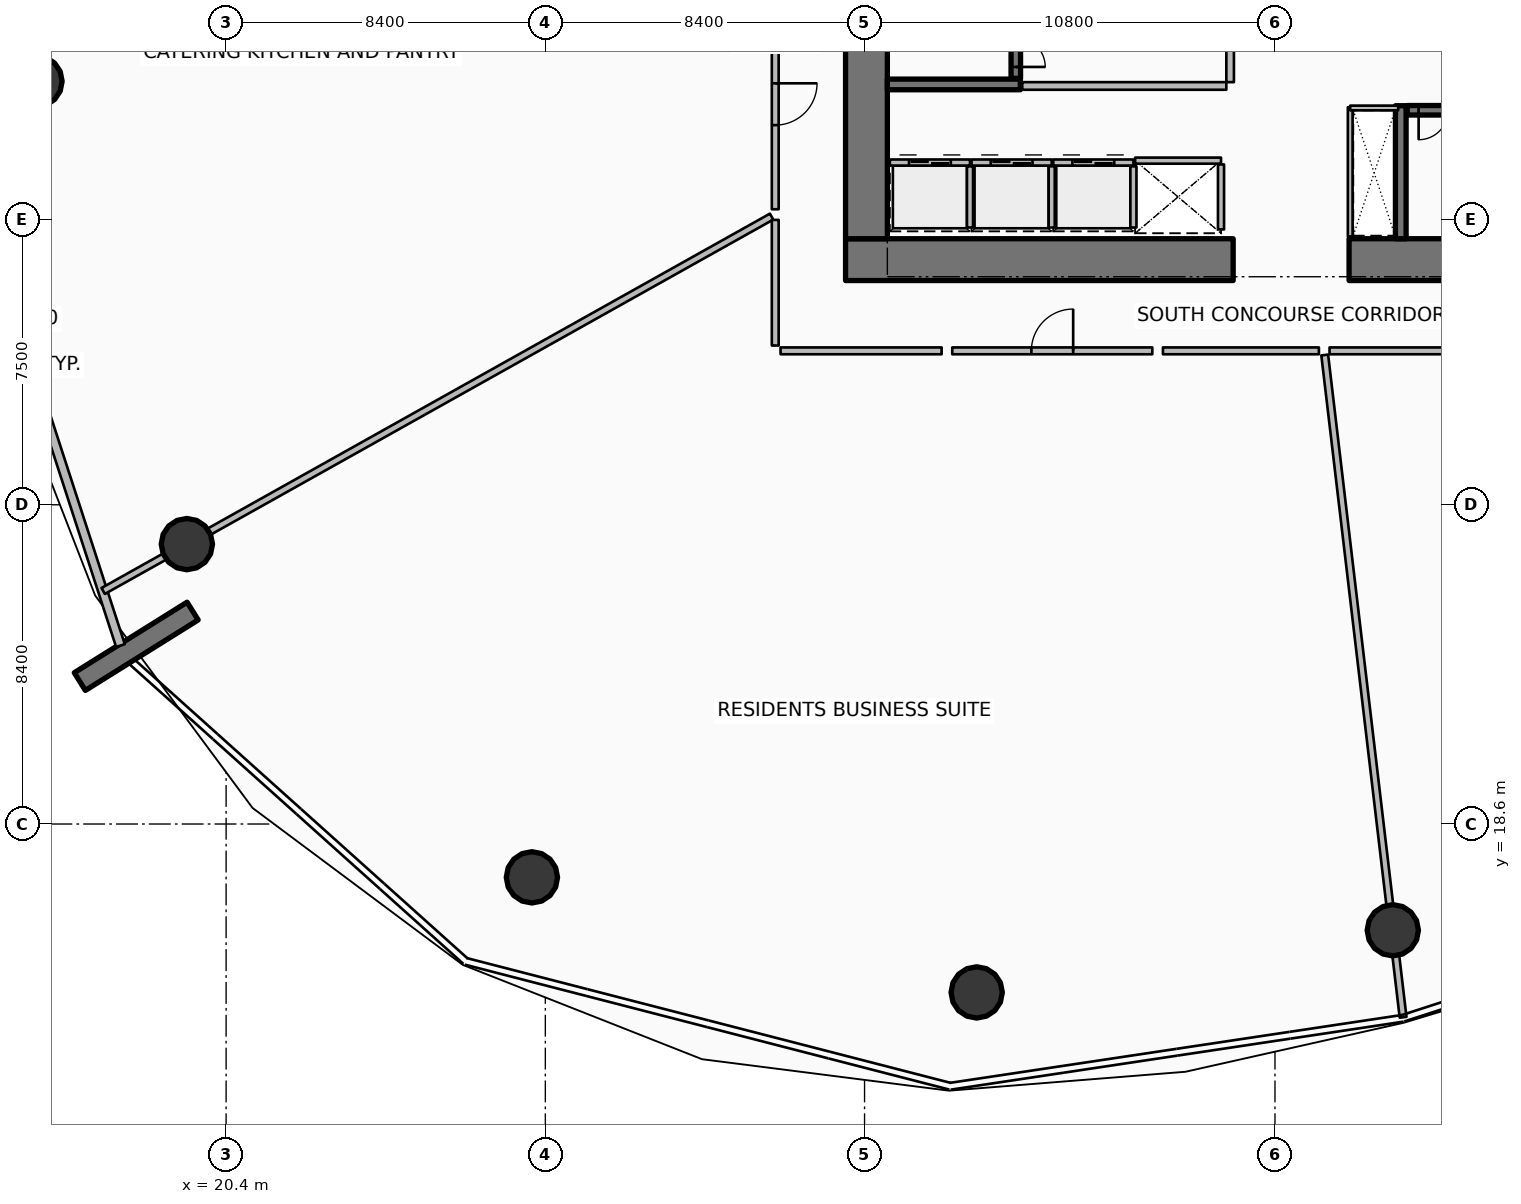
"""IFC4 building model, lengths in metres.
Left out: names, types, materials, properties, quantities, classifications, styles, units other than length and angle.
Written with IfcOpenShell. Run it as: python <this file> out.ifc"""

import sys

from ifc_helpers import new_model, si_unit, direction, frame, frame_2d, origin, origin_2d, place, context, subcontext, project, spatial, rectangle, circle, extrude, element, fill, save


model = new_model("IFC4")
c1 = context("Model", 3, precision=1e-05, world=origin(), true_north=direction((0.0, 1.0)))
c2 = subcontext(c1, "Body", "Model", "MODEL_VIEW")
j1 = project(units=[si_unit("LENGTHUNIT", "METRE"), si_unit("PLANEANGLEUNIT", "RADIAN")], contexts=[c1])
p1 = place(None, origin())
s1 = spatial("IfcSite", under=j1, at=p1, CompositionType="ELEMENT")
p2 = place(p1, origin())
s2 = spatial("IfcBuilding", under=s1, at=p2, CompositionType="ELEMENT")
p3 = place(p2, frame((0.0, 0.0, 7.2)))
s3 = spatial("IfcBuildingStorey", under=s2, at=p3, CompositionType="ELEMENT", Elevation=7.2)
for number, where, z_axis, x_axis in (
    (1, (36.7, 33.45, 0.0), (0.0, 0.0, 1.0), (1.0, 0.0, 0.0)),
    (2, (49.95, 33.45, 0.0), (0.0, 0.0, 1.0), (1.0, 0.0, 0.0)),
):
    element("IfcWall", number, at=place(p3, frame(where, z_axis=z_axis, x_axis=x_axis)), inside=s3, PredefinedType="SHEAR", context=c2, shape_type="SweptSolid", body=[
        extrude(rectangle(XDim=10.2, YDim=1.1, at=frame_2d((5.1, 0.0))), origin(), (0.0, 0.0, 1.0), 4.8),
    ])
p4 = place(p3, frame((37.25, 34.0, 0.0), z_axis=(0.0, 0.0, 1.0), x_axis=(0.0, 1.0, 0.0)))
e3 = element("IfcWall", 3, at=p4, inside=s3, PredefinedType="SHEAR", context=c2, shape_type="SweptSolid", body=[
    extrude(rectangle(XDim=16.0, YDim=1.1, at=frame_2d((8.0, 0.0))), origin(), (0.0, 0.0, 1.0), 4.8),
])
for number, where, z_axis, x_axis in (
    (4, (37.8, 38.06, 0.0), (0.0, 0.0, 1.0), (1.0, 0.0, 0.0)),
    (5, (51.31, 34.0, 0.0), (0.0, 0.0, 1.0), (0.0, 1.0, 0.0)),
):
    element("IfcWall", number, at=place(p3, frame(where, z_axis=z_axis, x_axis=x_axis)), inside=s3, PredefinedType="SHEAR", context=c2, shape_type="SweptSolid", body=[
        extrude(rectangle(XDim=3.5, YDim=0.28, at=frame_2d((1.75, 0.0))), origin(), (0.0, 0.0, 1.0), 4.8),
    ])
p5 = place(p3, frame((19.519, 24.203, 0.0), z_axis=(0.0, 0.0, 1.0), x_axis=(-0.848053161125, -0.529911158502, 0.0)))
e6 = element("IfcWall", 6, at=p5, inside=s3, PredefinedType="SOLIDWALL", context=c2, shape_type="SweptSolid", body=[
    extrude(rectangle(XDim=3.5, YDim=0.55, at=frame_2d((1.75, 0.0))), origin(), (0.0, 0.0, 1.0), 4.8),
])
for number, where, z_axis, x_axis in (
    (7, (15.41, 38.143, 0.0), (0.0, 0.0, 1.0), (1.0, 0.0, 0.0)),
    (8, (19.367, 25.965, 0.0), (0.0, 0.0, 1.0), (1.0, 0.0, 0.0)),
    (9, (28.447, 17.197, 0.0), (0.0, 0.0, 1.0), (1.0, 0.0, 0.0)),
    (10, (40.151, 14.169, 0.0), (0.0, 0.0, 1.0), (1.0, 0.0, 0.0)),
    (11, (51.101, 15.804, 0.0), (0.0, 0.0, 1.0), (1.0, 0.0, 0.0)),
):
    element("IfcColumn", number, at=place(p3, frame(where, z_axis=z_axis, x_axis=x_axis)), inside=s3, PredefinedType="COLUMN", context=c2, shape_type="SweptSolid", body=[
        extrude(circle(Radius=0.675, at=origin_2d()), origin(), (0.0, 0.0, 1.0), 4.48),
    ])
p6 = place(p3, frame((12.427, 39.275, 0.0), z_axis=(0.0, 0.0, 1.0), x_axis=(0.309022005354, -0.951054888115, 0.0)))
e12 = element("IfcWall", 12, at=p6, inside=s3, PredefinedType="SOLIDWALL", context=c2, shape_type="SweptSolid", body=[
    extrude(rectangle(XDim=16.803, YDim=0.24, at=frame_2d((8.401, 0.0))), origin(), (0.0, 0.0, 1.0), 3.43),
])
p7 = place(p6, frame((7.201, 0.0, 0.85)))
e13 = element("IfcOpeningElement", 13, at=p7, cuts=e12, PredefinedType="OPENING", context=c2, shape_type="SweptSolid", body=[
    extrude(rectangle(XDim=2.4, YDim=2.1, at=frame_2d((1.2, 1.05))), frame((0.0, 0.13, 0.0), z_axis=(0.0, -1.0, 0.0), x_axis=(1.0, 0.0, 0.0)), (0.0, 0.0, 1.0), 0.26),
])
p8 = place(p3, frame((41.18, 38.22, 0.0), z_axis=(0.0, 0.0, 1.0), x_axis=(0.0, 1.0, 0.0)))
e14 = element("IfcWall", 14, at=p8, inside=s3, PredefinedType="SOLIDWALL", context=c2, shape_type="SweptSolid", body=[
    extrude(rectangle(XDim=7.56, YDim=0.25, at=frame_2d((3.78, 0.0))), origin(), (0.0, 0.0, 1.0), 4.48),
])
p9 = place(p8, frame((0.3, 0.0, 0.0)))
e15 = element("IfcOpeningElement", 15, at=p9, cuts=e14, PredefinedType="OPENING", context=c2, shape_type="SweptSolid", body=[
    extrude(rectangle(XDim=1.55, YDim=2.15, at=frame_2d((0.775, 1.075))), frame((0.0, 0.135, 0.0), z_axis=(0.0, -1.0, 0.0), x_axis=(1.0, 0.0, 0.0)), (0.0, 0.0, 1.0), 0.27),
])
p10 = place(p3, frame((51.48, 37.38, 0.0), z_axis=(0.0, 0.0, 1.0), x_axis=(1.0, 0.0, 0.0)))
e16 = element("IfcWall", 16, at=p10, inside=s3, PredefinedType="SOLIDWALL", context=c2, shape_type="SweptSolid", body=[
    extrude(rectangle(XDim=7.54, YDim=0.25, at=frame_2d((3.77, 0.0))), origin(), (0.0, 0.0, 1.0), 4.48),
])
p11 = place(p10, frame((0.3, 0.0, 0.0)))
e17 = element("IfcOpeningElement", 17, at=p11, cuts=e16, PredefinedType="OPENING", context=c2, shape_type="SweptSolid", body=[
    extrude(rectangle(XDim=1.55, YDim=2.15, at=frame_2d((0.775, 1.075))), frame((0.0, 0.135, 0.0), z_axis=(0.0, -1.0, 0.0), x_axis=(1.0, 0.0, 0.0)), (0.0, 0.0, 1.0), 0.27),
])
p12 = place(p3, frame((37.865, 36.005, 0.0), z_axis=(0.0, 0.0, 1.0), x_axis=(1.0, 0.0, 0.0)))
e18 = element("IfcWall", 18, at=p12, inside=s3, PredefinedType="PARTITIONING", context=c2, shape_type="SweptSolid", body=[
    extrude(rectangle(XDim=2.11, YDim=0.16, at=frame_2d((1.055, 0.0))), origin(), (0.0, 0.0, 1.0), 4.48),
])
p13 = place(p12, frame((0.505, 0.0, 0.0)))
e19 = element("IfcOpeningElement", 19, at=p13, cuts=e18, PredefinedType="OPENING", context=c2, shape_type="SweptSolid", body=[
    extrude(rectangle(XDim=1.1, YDim=2.1, at=frame_2d((0.55, 1.05))), frame((0.0, 0.09, 0.0), z_axis=(0.0, -1.0, 0.0), x_axis=(1.0, 0.0, 0.0)), (0.0, 0.0, 1.0), 0.18),
])
p14 = place(p3, frame((39.975, 34.295, 0.0), z_axis=(0.0, 0.0, 1.0), x_axis=(0.0, 1.0, 0.0)))
e20 = element("IfcWall", 20, at=p14, inside=s3, PredefinedType="PARTITIONING", context=c2, shape_type="SweptSolid", body=[
    extrude(rectangle(XDim=1.61, YDim=0.16, at=frame_2d((0.805, 0.0))), origin(), (0.0, 0.0, 1.0), 4.48),
])
p15 = place(p3, frame((40.015, 36.005, 0.0), z_axis=(0.0, 0.0, 1.0), x_axis=(1.0, 0.0, 0.0)))
e21 = element("IfcWall", 21, at=p15, inside=s3, PredefinedType="PARTITIONING", context=c2, shape_type="SweptSolid", body=[
    extrude(rectangle(XDim=2.11, YDim=0.16, at=frame_2d((1.055, 0.0))), origin(), (0.0, 0.0, 1.0), 4.48),
])
p16 = place(p15, frame((0.505, 0.0, 0.0)))
e22 = element("IfcOpeningElement", 22, at=p16, cuts=e21, PredefinedType="OPENING", context=c2, shape_type="SweptSolid", body=[
    extrude(rectangle(XDim=1.1, YDim=2.1, at=frame_2d((0.55, 1.05))), frame((0.0, 0.09, 0.0), z_axis=(0.0, -1.0, 0.0), x_axis=(1.0, 0.0, 0.0)), (0.0, 0.0, 1.0), 0.18),
])
p17 = place(p3, frame((42.125, 34.295, 0.0), z_axis=(0.0, 0.0, 1.0), x_axis=(0.0, 1.0, 0.0)))
e23 = element("IfcWall", 23, at=p17, inside=s3, PredefinedType="PARTITIONING", context=c2, shape_type="SweptSolid", body=[
    extrude(rectangle(XDim=1.61, YDim=0.16, at=frame_2d((0.805, 0.0))), origin(), (0.0, 0.0, 1.0), 4.48),
])
p18 = place(p3, frame((42.165, 36.005, 0.0), z_axis=(0.0, 0.0, 1.0), x_axis=(1.0, 0.0, 0.0)))
e24 = element("IfcWall", 24, at=p18, inside=s3, PredefinedType="PARTITIONING", context=c2, shape_type="SweptSolid", body=[
    extrude(rectangle(XDim=2.11, YDim=0.16, at=frame_2d((1.055, 0.0))), origin(), (0.0, 0.0, 1.0), 4.48),
])
p19 = place(p18, frame((0.505, 0.0, 0.0)))
e25 = element("IfcOpeningElement", 25, at=p19, cuts=e24, PredefinedType="OPENING", context=c2, shape_type="SweptSolid", body=[
    extrude(rectangle(XDim=1.1, YDim=2.1, at=frame_2d((0.55, 1.05))), frame((0.0, 0.09, 0.0), z_axis=(0.0, -1.0, 0.0), x_axis=(1.0, 0.0, 0.0)), (0.0, 0.0, 1.0), 0.18),
])
p20 = place(p3, frame((44.275, 34.295, 0.0), z_axis=(0.0, 0.0, 1.0), x_axis=(0.0, 1.0, 0.0)))
e26 = element("IfcWall", 26, at=p20, inside=s3, PredefinedType="PARTITIONING", context=c2, shape_type="SweptSolid", body=[
    extrude(rectangle(XDim=1.61, YDim=0.16, at=frame_2d((0.805, 0.0))), origin(), (0.0, 0.0, 1.0), 4.48),
])
p21 = place(p3, frame((44.32, 36.055, 0.0), z_axis=(0.0, 0.0, 1.0), x_axis=(1.0, 0.0, 0.0)))
e27 = element("IfcWall", 27, at=p21, inside=s3, PredefinedType="PARTITIONING", context=c2, shape_type="SweptSolid", body=[
    extrude(rectangle(XDim=2.26, YDim=0.16, at=frame_2d((1.13, 0.0))), origin(), (0.0, 0.0, 1.0), 4.48),
])
p22 = place(p3, frame((46.58, 34.245, 0.0), z_axis=(0.0, 0.0, 1.0), x_axis=(0.0, 1.0, 0.0)))
e28 = element("IfcWall", 28, at=p22, inside=s3, PredefinedType="PARTITIONING", context=c2, shape_type="SweptSolid", body=[
    extrude(rectangle(XDim=1.71, YDim=0.16, at=frame_2d((0.855, 0.0))), origin(), (0.0, 0.0, 1.0), 4.48),
])
p23 = place(p3, frame((41.35, 38.02, 0.0), z_axis=(0.0, 0.0, 1.0), x_axis=(1.0, 0.0, 0.0)))
e29 = element("IfcWall", 29, at=p23, inside=s3, PredefinedType="PARTITIONING", context=c2, shape_type="SweptSolid", body=[
    extrude(rectangle(XDim=5.37, YDim=0.2, at=frame_2d((2.685, 0.0))), origin(), (0.0, 0.0, 1.0), 4.48),
])
p24 = place(p3, frame((46.82, 38.12, 0.0), z_axis=(0.0, 0.0, 1.0), x_axis=(0.0, 1.0, 0.0)))
e30 = element("IfcWall", 30, at=p24, inside=s3, PredefinedType="PARTITIONING", context=c2, shape_type="SweptSolid", body=[
    extrude(rectangle(XDim=3.26, YDim=0.2, at=frame_2d((1.63, 0.0))), origin(), (0.0, 0.0, 1.0), 4.48),
])
p25 = place(p24, frame((1.105, 0.0, 0.0)))
e31 = element("IfcOpeningElement", 31, at=p25, cuts=e30, PredefinedType="OPENING", context=c2, shape_type="SweptSolid", body=[
    extrude(rectangle(XDim=1.05, YDim=2.1, at=frame_2d((0.525, 1.05))), frame((0.0, 0.11, 0.0), z_axis=(0.0, -1.0, 0.0), x_axis=(1.0, 0.0, 0.0)), (0.0, 0.0, 1.0), 0.22),
])
p26 = place(p3, frame((49.98, 34.06, 0.0), z_axis=(0.0, 0.0, 1.0), x_axis=(0.0, 1.0, 0.0)))
e32 = element("IfcWall", 32, at=p26, inside=s3, PredefinedType="PARTITIONING", context=c2, shape_type="SweptSolid", body=[
    extrude(rectangle(XDim=3.4, YDim=0.125, at=frame_2d((1.7, 0.0))), origin(), (0.0, 0.0, 1.0), 3.92),
])
p27 = place(p3, frame((49.98, 37.44, 0.0), z_axis=(0.0, 0.0, 1.0), x_axis=(1.0, 0.0, 0.0)))
e33 = element("IfcWall", 33, at=p27, inside=s3, PredefinedType="PARTITIONING", context=c2, shape_type="SweptSolid", body=[
    extrude(rectangle(XDim=1.26, YDim=0.125, at=frame_2d((0.63, 0.0))), origin(), (0.0, 0.0, 1.0), 3.92),
])
p28 = place(p3, frame((34.85, 40.304, 0.0), z_axis=(0.0, 0.0, 1.0), x_axis=(0.0, -1.0, 0.0)))
e34 = element("IfcWall", 34, at=p28, inside=s3, PredefinedType="PARTITIONING", context=c2, shape_type="SweptSolid", body=[
    extrude(rectangle(XDim=5.528, YDim=0.18, at=frame_2d((2.764, 0.0))), origin(), (0.0, 0.0, 1.0), 3.693),
])
p29 = place(p28, frame((2.214, 0.0, 0.0)))
e35 = element("IfcOpeningElement", 35, at=p29, cuts=e34, PredefinedType="OPENING", context=c2, shape_type="SweptSolid", body=[
    extrude(rectangle(XDim=1.1, YDim=2.1, at=frame_2d((0.55, 1.05))), frame((0.0, 0.1, 0.0), z_axis=(0.0, -1.0, 0.0), x_axis=(1.0, 0.0, 0.0)), (0.0, 0.0, 1.0), 0.2),
])
p30 = place(p3, frame((34.754, 34.582, 0.0), z_axis=(0.0, 0.0, 1.0), x_axis=(-0.872493211438, -0.488626233429, 0.0)))
e36 = element("IfcWall", 36, at=p30, inside=s3, PredefinedType="PARTITIONING", context=c2, shape_type="SweptSolid", body=[
    extrude(rectangle(XDim=20.159, YDim=0.18, at=frame_2d((10.079, 0.0))), origin(), (0.0, 0.0, 1.0), 3.693),
])
p31 = place(p3, frame((34.85, 34.496, 0.0), z_axis=(0.0, 0.0, 1.0), x_axis=(0.0, -1.0, 0.0)))
e37 = element("IfcWall", 37, at=p31, inside=s3, PredefinedType="PARTITIONING", context=c2, shape_type="SweptSolid", body=[
    extrude(rectangle(XDim=3.306, YDim=0.18, at=frame_2d((1.653, 0.0))), origin(), (0.0, 0.0, 1.0), 3.693),
])
p32 = place(p3, frame((34.99, 31.05, 0.0), z_axis=(0.0, 0.0, 1.0), x_axis=(1.0, 0.0, 0.0)))
e38 = element("IfcWall", 38, at=p32, inside=s3, PredefinedType="PARTITIONING", context=c2, shape_type="SweptSolid", body=[
    extrude(rectangle(XDim=4.238, YDim=0.18, at=frame_2d((2.119, 0.0))), origin(), (0.0, 0.0, 1.0), 3.693),
])
p33 = place(p3, frame((39.508, 31.05, 0.0), z_axis=(0.0, 0.0, 1.0), x_axis=(1.0, 0.0, 0.0)))
e39 = element("IfcWall", 39, at=p33, inside=s3, PredefinedType="PARTITIONING", context=c2, shape_type="SweptSolid", body=[
    extrude(rectangle(XDim=5.264, YDim=0.18, at=frame_2d((2.632, 0.0))), origin(), (0.0, 0.0, 1.0), 3.693),
])
p34 = place(p33, frame((2.082, 0.0, 0.0)))
e40 = element("IfcOpeningElement", 40, at=p34, cuts=e39, PredefinedType="OPENING", context=c2, shape_type="SweptSolid", body=[
    extrude(rectangle(XDim=1.1, YDim=2.1, at=frame_2d((0.55, 1.05))), frame((0.0, 0.1, 0.0), z_axis=(0.0, -1.0, 0.0), x_axis=(1.0, 0.0, 0.0)), (0.0, 0.0, 1.0), 0.2),
])
p35 = place(p3, frame((45.052, 31.05, 0.0), z_axis=(0.0, 0.0, 1.0), x_axis=(1.0, 0.0, 0.0)))
e41 = element("IfcWall", 41, at=p35, inside=s3, PredefinedType="PARTITIONING", context=c2, shape_type="SweptSolid", body=[
    extrude(rectangle(XDim=4.104, YDim=0.18, at=frame_2d((2.052, 0.0))), origin(), (0.0, 0.0, 1.0), 3.693),
])
p36 = place(p3, frame((49.309, 30.941, 0.0), z_axis=(0.0, 0.0, 1.0), x_axis=(0.117547531601, -0.993067257448, 0.0)))
e42 = element("IfcWall", 42, at=p36, inside=s3, PredefinedType="PARTITIONING", context=c2, shape_type="SweptSolid", body=[
    extrude(rectangle(XDim=17.548, YDim=0.18, at=frame_2d((8.774, 0.0))), origin(), (0.0, 0.0, 1.0), 3.693),
])
p37 = place(p3, frame((49.436, 31.05, 0.0), z_axis=(0.0, 0.0, 1.0), x_axis=(1.0, 0.0, 0.0)))
e43 = element("IfcWall", 43, at=p37, inside=s3, PredefinedType="PARTITIONING", context=c2, shape_type="SweptSolid", body=[
    extrude(rectangle(XDim=4.556, YDim=0.18, at=frame_2d((2.278, 0.0))), origin(), (0.0, 0.0, 1.0), 3.693),
])
p38 = place(p9, origin())
e44 = element("IfcDoor", 44, at=p38, inside=s3, OperationType="DOUBLE_DOOR_SINGLE_SWING", PredefinedType="DOOR", context=c2, shape_type="SweptSolid", body=[
    extrude(rectangle(XDim=1.55, YDim=2.15, at=frame_2d((0.775, 1.075))), frame((0.0, 0.025, 0.0), z_axis=(0.0, -1.0, 0.0), x_axis=(1.0, 0.0, 0.0)), (0.0, 0.0, 1.0), 0.05),
])
fill(e15, e44)
p39 = place(p11, origin())
e45 = element("IfcDoor", 45, at=p39, inside=s3, OperationType="DOUBLE_DOOR_SINGLE_SWING", PredefinedType="DOOR", context=c2, shape_type="SweptSolid", body=[
    extrude(rectangle(XDim=1.55, YDim=2.15, at=frame_2d((0.775, 1.075))), frame((0.0, 0.025, 0.0), z_axis=(0.0, -1.0, 0.0), x_axis=(1.0, 0.0, 0.0)), (0.0, 0.0, 1.0), 0.05),
])
fill(e17, e45)
p40 = place(p13, origin())
e46 = element("IfcDoor", 46, at=p40, inside=s3, OperationType="DOUBLE_DOOR_SLIDING", PredefinedType="DOOR", context=c2, shape_type="SweptSolid", body=[
    extrude(rectangle(XDim=1.1, YDim=2.1, at=frame_2d((0.55, 1.05))), frame((0.0, 0.025, 0.0), z_axis=(0.0, -1.0, 0.0), x_axis=(1.0, 0.0, 0.0)), (0.0, 0.0, 1.0), 0.05),
])
fill(e19, e46)
p41 = place(p16, origin())
e47 = element("IfcDoor", 47, at=p41, inside=s3, OperationType="DOUBLE_DOOR_SLIDING", PredefinedType="DOOR", context=c2, shape_type="SweptSolid", body=[
    extrude(rectangle(XDim=1.1, YDim=2.1, at=frame_2d((0.55, 1.05))), frame((0.0, 0.025, 0.0), z_axis=(0.0, -1.0, 0.0), x_axis=(1.0, 0.0, 0.0)), (0.0, 0.0, 1.0), 0.05),
])
fill(e22, e47)
p42 = place(p19, origin())
e48 = element("IfcDoor", 48, at=p42, inside=s3, OperationType="DOUBLE_DOOR_SLIDING", PredefinedType="DOOR", context=c2, shape_type="SweptSolid", body=[
    extrude(rectangle(XDim=1.1, YDim=2.1, at=frame_2d((0.55, 1.05))), frame((0.0, 0.025, 0.0), z_axis=(0.0, -1.0, 0.0), x_axis=(1.0, 0.0, 0.0)), (0.0, 0.0, 1.0), 0.05),
])
fill(e25, e48)
p43 = place(p29, origin())
e49 = element("IfcDoor", 49, at=p43, inside=s3, OperationType="SINGLE_SWING_LEFT", PredefinedType="DOOR", context=c2, shape_type="SweptSolid", body=[
    extrude(rectangle(XDim=1.1, YDim=2.1, at=frame_2d((0.55, 1.05))), frame((0.0, 0.025, 0.0), z_axis=(0.0, -1.0, 0.0), x_axis=(1.0, 0.0, 0.0)), (0.0, 0.0, 1.0), 0.05),
])
fill(e35, e49)
p44 = place(p34, origin())
e50 = element("IfcDoor", 50, at=p44, inside=s3, OperationType="SINGLE_SWING_RIGHT", PredefinedType="DOOR", context=c2, shape_type="SweptSolid", body=[
    extrude(rectangle(XDim=1.1, YDim=2.1, at=frame_2d((0.55, 1.05))), frame((0.0, 0.025, 0.0), z_axis=(0.0, -1.0, 0.0), x_axis=(1.0, 0.0, 0.0)), (0.0, 0.0, 1.0), 0.05),
])
fill(e40, e50)
save(model, sys.argv[1])
